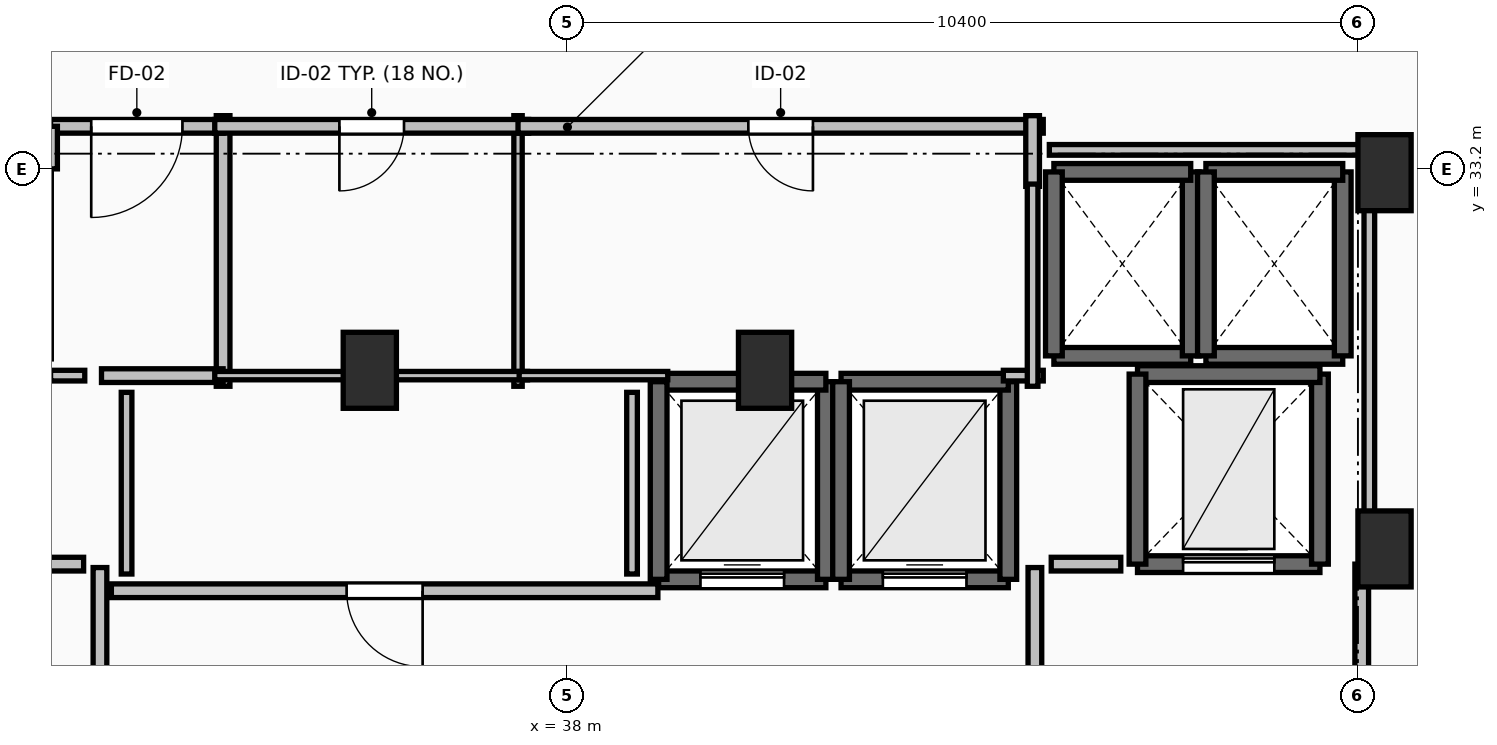
"""IFC4 building model, lengths in metres.
Left out: names, types, materials, properties, quantities, classifications, styles, units other than length and angle.
Written with IfcOpenShell. Run it as: python <this file> out.ifc"""

import sys

from ifc_helpers import new_model, si_unit, direction, frame, frame_2d, origin, origin_2d, place, context, subcontext, project, spatial, rectangle, extrude, element, fill, save


model = new_model("IFC4")
c1 = context("Model", 3, precision=1e-05, world=origin(), true_north=direction((0.0, 1.0)))
c2 = subcontext(c1, "Body", "Model", "MODEL_VIEW")
j1 = project(units=[si_unit("LENGTHUNIT", "METRE"), si_unit("PLANEANGLEUNIT", "RADIAN")], contexts=[c1])
p1 = place(None, origin())
s1 = spatial("IfcSite", under=j1, at=p1, CompositionType="ELEMENT")
p2 = place(p1, origin())
s2 = spatial("IfcBuilding", under=s1, at=p2, CompositionType="ELEMENT")
p3 = place(p2, frame((0.0, 0.0, 269.75)))
s3 = spatial("IfcBuildingStorey", under=s2, at=p3, CompositionType="ELEMENT", Elevation=269.75)
for number, where, z_axis, x_axis in (
    (1, (48.75, 33.15, 0.0), (0.0, 0.0, 1.0), (1.0, 0.0, 0.0)),
    (2, (48.75, 28.2, 0.0), (0.0, 0.0, 1.0), (1.0, 0.0, 0.0)),
    (3, (35.4, 30.55, 0.0), (0.0, 0.0, 1.0), (1.0, 0.0, 0.0)),
    (4, (40.6, 30.55, 0.0), (0.0, 0.0, 1.0), (1.0, 0.0, 0.0)),
):
    element("IfcColumn", number, at=place(p3, frame(where, z_axis=z_axis, x_axis=x_axis)), inside=s3, PredefinedType="PILASTER", context=c2, shape_type="SweptSolid", body=[
        extrude(rectangle(XDim=0.7, YDim=1.0, at=origin_2d()), origin(), (0.0, 0.0, 1.0), 3.55),
    ])
p4 = place(p3, frame((39.2, 27.8, 0.0), z_axis=(0.0, 0.0, 1.0), x_axis=(1.0, 0.0, 0.0)))
e5 = element("IfcWall", 5, at=p4, inside=s3, PredefinedType="SOLIDWALL", context=c2, shape_type="SweptSolid", body=[
    extrude(rectangle(XDim=2.2, YDim=0.22, at=frame_2d((1.1, 0.0))), origin(), (0.0, 0.0, 1.0), 3.29),
])
p5 = place(p4, frame((0.55, 0.0, 0.0)))
e6 = element("IfcOpeningElement", 6, at=p5, cuts=e5, PredefinedType="OPENING", context=c2, shape_type="SweptSolid", body=[
    extrude(rectangle(XDim=1.1, YDim=2.2, at=frame_2d((0.55, 1.1))), frame((0.0, 0.125, 0.0), z_axis=(0.0, -1.0, 0.0), x_axis=(1.0, 0.0, 0.0)), (0.0, 0.0, 1.0), 0.25),
])
p6 = place(p3, frame((41.4, 27.8, 0.0), z_axis=(0.0, 0.0, 1.0), x_axis=(0.0, 1.0, 0.0)))
e7 = element("IfcWall", 7, at=p6, inside=s3, PredefinedType="SOLIDWALL", context=c2, shape_type="SweptSolid", body=[
    extrude(rectangle(XDim=2.6, YDim=0.22, at=frame_2d((1.3, 0.0))), origin(), (0.0, 0.0, 1.0), 3.29),
])
p7 = place(p3, frame((41.4, 30.4, 0.0), z_axis=(0.0, 0.0, 1.0), x_axis=(-1.0, 0.0, 0.0)))
e8 = element("IfcWall", 8, at=p7, inside=s3, PredefinedType="SOLIDWALL", context=c2, shape_type="SweptSolid", body=[
    extrude(rectangle(XDim=2.2, YDim=0.22, at=frame_2d((1.1, 0.0))), origin(), (0.0, 0.0, 1.0), 3.29),
])
p8 = place(p3, frame((39.2, 30.4, 0.0), z_axis=(0.0, 0.0, 1.0), x_axis=(0.0, -1.0, 0.0)))
e9 = element("IfcWall", 9, at=p8, inside=s3, PredefinedType="SOLIDWALL", context=c2, shape_type="SweptSolid", body=[
    extrude(rectangle(XDim=2.6, YDim=0.22, at=frame_2d((1.3, 0.0))), origin(), (0.0, 0.0, 1.0), 3.29),
])
p9 = place(p3, frame((41.6, 27.8, 0.0), z_axis=(0.0, 0.0, 1.0), x_axis=(1.0, 0.0, 0.0)))
e10 = element("IfcWall", 10, at=p9, inside=s3, PredefinedType="SOLIDWALL", context=c2, shape_type="SweptSolid", body=[
    extrude(rectangle(XDim=2.2, YDim=0.22, at=frame_2d((1.1, 0.0))), origin(), (0.0, 0.0, 1.0), 3.29),
])
p10 = place(p9, frame((0.55, 0.0, 0.0)))
e11 = element("IfcOpeningElement", 11, at=p10, cuts=e10, PredefinedType="OPENING", context=c2, shape_type="SweptSolid", body=[
    extrude(rectangle(XDim=1.1, YDim=2.2, at=frame_2d((0.55, 1.1))), frame((0.0, 0.125, 0.0), z_axis=(0.0, -1.0, 0.0), x_axis=(1.0, 0.0, 0.0)), (0.0, 0.0, 1.0), 0.25),
])
p11 = place(p3, frame((43.8, 27.8, 0.0), z_axis=(0.0, 0.0, 1.0), x_axis=(0.0, 1.0, 0.0)))
e12 = element("IfcWall", 12, at=p11, inside=s3, PredefinedType="SOLIDWALL", context=c2, shape_type="SweptSolid", body=[
    extrude(rectangle(XDim=2.6, YDim=0.22, at=frame_2d((1.3, 0.0))), origin(), (0.0, 0.0, 1.0), 3.29),
])
p12 = place(p3, frame((43.8, 30.4, 0.0), z_axis=(0.0, 0.0, 1.0), x_axis=(-1.0, 0.0, 0.0)))
e13 = element("IfcWall", 13, at=p12, inside=s3, PredefinedType="SOLIDWALL", context=c2, shape_type="SweptSolid", body=[
    extrude(rectangle(XDim=2.2, YDim=0.22, at=frame_2d((1.1, 0.0))), origin(), (0.0, 0.0, 1.0), 3.29),
])
p13 = place(p3, frame((41.6, 30.4, 0.0), z_axis=(0.0, 0.0, 1.0), x_axis=(0.0, -1.0, 0.0)))
e14 = element("IfcWall", 14, at=p13, inside=s3, PredefinedType="SOLIDWALL", context=c2, shape_type="SweptSolid", body=[
    extrude(rectangle(XDim=2.6, YDim=0.22, at=frame_2d((1.3, 0.0))), origin(), (0.0, 0.0, 1.0), 3.29),
])
p14 = place(p3, frame((44.4, 30.74, 0.0), z_axis=(0.0, 0.0, 1.0), x_axis=(1.0, 0.0, 0.0)))
e15 = element("IfcWall", 15, at=p14, inside=s3, PredefinedType="SOLIDWALL", context=c2, shape_type="SweptSolid", body=[
    extrude(rectangle(XDim=1.8, YDim=0.22, at=frame_2d((0.9, 0.0))), origin(), (0.0, 0.0, 1.0), 3.29),
])
p15 = place(p3, frame((46.2, 30.74, 0.0), z_axis=(0.0, 0.0, 1.0), x_axis=(0.0, 1.0, 0.0)))
e16 = element("IfcWall", 16, at=p15, inside=s3, PredefinedType="SOLIDWALL", context=c2, shape_type="SweptSolid", body=[
    extrude(rectangle(XDim=2.42, YDim=0.22, at=frame_2d((1.21, 0.0))), origin(), (0.0, 0.0, 1.0), 3.29),
])
p16 = place(p3, frame((46.2, 33.16, 0.0), z_axis=(0.0, 0.0, 1.0), x_axis=(-1.0, 0.0, 0.0)))
e17 = element("IfcWall", 17, at=p16, inside=s3, PredefinedType="SOLIDWALL", context=c2, shape_type="SweptSolid", body=[
    extrude(rectangle(XDim=1.8, YDim=0.22, at=frame_2d((0.9, 0.0))), origin(), (0.0, 0.0, 1.0), 3.29),
])
p17 = place(p3, frame((44.4, 33.16, 0.0), z_axis=(0.0, 0.0, 1.0), x_axis=(0.0, -1.0, 0.0)))
e18 = element("IfcWall", 18, at=p17, inside=s3, PredefinedType="SOLIDWALL", context=c2, shape_type="SweptSolid", body=[
    extrude(rectangle(XDim=2.42, YDim=0.22, at=frame_2d((1.21, 0.0))), origin(), (0.0, 0.0, 1.0), 3.29),
])
p18 = place(p3, frame((46.4, 30.74, 0.0), z_axis=(0.0, 0.0, 1.0), x_axis=(1.0, 0.0, 0.0)))
e19 = element("IfcWall", 19, at=p18, inside=s3, PredefinedType="SOLIDWALL", context=c2, shape_type="SweptSolid", body=[
    extrude(rectangle(XDim=1.8, YDim=0.22, at=frame_2d((0.9, 0.0))), origin(), (0.0, 0.0, 1.0), 3.29),
])
p19 = place(p3, frame((48.2, 30.74, 0.0), z_axis=(0.0, 0.0, 1.0), x_axis=(0.0, 1.0, 0.0)))
e20 = element("IfcWall", 20, at=p19, inside=s3, PredefinedType="SOLIDWALL", context=c2, shape_type="SweptSolid", body=[
    extrude(rectangle(XDim=2.42, YDim=0.22, at=frame_2d((1.21, 0.0))), origin(), (0.0, 0.0, 1.0), 3.29),
])
p20 = place(p3, frame((48.2, 33.16, 0.0), z_axis=(0.0, 0.0, 1.0), x_axis=(-1.0, 0.0, 0.0)))
e21 = element("IfcWall", 21, at=p20, inside=s3, PredefinedType="SOLIDWALL", context=c2, shape_type="SweptSolid", body=[
    extrude(rectangle(XDim=1.8, YDim=0.22, at=frame_2d((0.9, 0.0))), origin(), (0.0, 0.0, 1.0), 3.29),
])
p21 = place(p3, frame((46.4, 33.16, 0.0), z_axis=(0.0, 0.0, 1.0), x_axis=(0.0, -1.0, 0.0)))
e22 = element("IfcWall", 22, at=p21, inside=s3, PredefinedType="SOLIDWALL", context=c2, shape_type="SweptSolid", body=[
    extrude(rectangle(XDim=2.42, YDim=0.22, at=frame_2d((1.21, 0.0))), origin(), (0.0, 0.0, 1.0), 3.29),
])
p22 = place(p3, frame((45.5, 28.0, 0.0), z_axis=(0.0, 0.0, 1.0), x_axis=(1.0, 0.0, 0.0)))
e23 = element("IfcWall", 23, at=p22, inside=s3, PredefinedType="SHEAR", context=c2, shape_type="SweptSolid", body=[
    extrude(rectangle(XDim=2.4, YDim=0.22, at=frame_2d((1.2, 0.0))), origin(), (0.0, 0.0, 1.0), 3.29),
])
p23 = place(p22, frame((0.6, 0.0, 0.0)))
e24 = element("IfcOpeningElement", 24, at=p23, cuts=e23, PredefinedType="OPENING", context=c2, shape_type="SweptSolid", body=[
    extrude(rectangle(XDim=1.2, YDim=2.2, at=frame_2d((0.6, 1.1))), frame((0.0, 0.125, 0.0), z_axis=(0.0, -1.0, 0.0), x_axis=(1.0, 0.0, 0.0)), (0.0, 0.0, 1.0), 0.25),
])
p24 = place(p3, frame((47.9, 28.0, 0.0), z_axis=(0.0, 0.0, 1.0), x_axis=(0.0, 1.0, 0.0)))
e25 = element("IfcWall", 25, at=p24, inside=s3, PredefinedType="SHEAR", context=c2, shape_type="SweptSolid", body=[
    extrude(rectangle(XDim=2.5, YDim=0.22, at=frame_2d((1.25, 0.0))), origin(), (0.0, 0.0, 1.0), 3.29),
])
p25 = place(p3, frame((47.9, 30.5, 0.0), z_axis=(0.0, 0.0, 1.0), x_axis=(-1.0, 0.0, 0.0)))
e26 = element("IfcWall", 26, at=p25, inside=s3, PredefinedType="SHEAR", context=c2, shape_type="SweptSolid", body=[
    extrude(rectangle(XDim=2.4, YDim=0.22, at=frame_2d((1.2, 0.0))), origin(), (0.0, 0.0, 1.0), 3.29),
])
p26 = place(p3, frame((45.5, 30.5, 0.0), z_axis=(0.0, 0.0, 1.0), x_axis=(0.0, -1.0, 0.0)))
e27 = element("IfcWall", 27, at=p26, inside=s3, PredefinedType="SHEAR", context=c2, shape_type="SweptSolid", body=[
    extrude(rectangle(XDim=2.5, YDim=0.22, at=frame_2d((1.25, 0.0))), origin(), (0.0, 0.0, 1.0), 3.29),
])
p27 = place(p3, frame((31.85, 24.045, 0.0), z_axis=(0.0, 0.0, 1.0), x_axis=(0.0, 1.0, 0.0)))
e28 = element("IfcWall", 28, at=p27, inside=s3, PredefinedType="PARTITIONING", context=c2, shape_type="SweptSolid", body=[
    extrude(rectangle(XDim=3.91, YDim=0.18, at=frame_2d((1.955, 0.0))), origin(), (0.0, 0.0, 1.0), 3.29),
])
p28 = place(p27, frame((1.355, 0.0, 0.0)))
e29 = element("IfcOpeningElement", 29, at=p28, cuts=e28, PredefinedType="OPENING", context=c2, shape_type="SweptSolid", body=[
    extrude(rectangle(XDim=1.2, YDim=2.15, at=frame_2d((0.6, 1.075))), frame((0.0, 0.105, 0.0), z_axis=(0.0, -1.0, 0.0), x_axis=(1.0, 0.0, 0.0)), (0.0, 0.0, 1.0), 0.21),
])
p29 = place(p3, frame((44.15, 27.955, 0.0), z_axis=(0.0, 0.0, 1.0), x_axis=(0.0, -1.0, 0.0)))
e30 = element("IfcWall", 30, at=p29, inside=s3, PredefinedType="PARTITIONING", context=c2, shape_type="SweptSolid", body=[
    extrude(rectangle(XDim=3.91, YDim=0.18, at=frame_2d((1.955, 0.0))), origin(), (0.0, 0.0, 1.0), 3.29),
])
p30 = place(p29, frame((1.355, 0.0, 0.0)))
e31 = element("IfcOpeningElement", 31, at=p30, cuts=e30, PredefinedType="OPENING", context=c2, shape_type="SweptSolid", body=[
    extrude(rectangle(XDim=1.2, YDim=2.15, at=frame_2d((0.6, 1.075))), frame((0.0, 0.105, 0.0), z_axis=(0.0, -1.0, 0.0), x_axis=(1.0, 0.0, 0.0)), (0.0, 0.0, 1.0), 0.21),
])
p31 = place(p3, frame((48.45, 23.95, 0.0), z_axis=(0.0, 0.0, 1.0), x_axis=(0.0, 1.0, 0.0)))
e32 = element("IfcWall", 32, at=p31, inside=s3, PredefinedType="PARTITIONING", context=c2, shape_type="SweptSolid", body=[
    extrude(rectangle(XDim=4.05, YDim=0.18, at=frame_2d((2.025, 0.0))), origin(), (0.0, 0.0, 1.0), 3.29),
])
p32 = place(p31, frame((1.425, 0.0, 0.0)))
e33 = element("IfcOpeningElement", 33, at=p32, cuts=e32, PredefinedType="OPENING", context=c2, shape_type="SweptSolid", body=[
    extrude(rectangle(XDim=1.2, YDim=2.15, at=frame_2d((0.6, 1.075))), frame((0.0, 0.105, 0.0), z_axis=(0.0, -1.0, 0.0), x_axis=(1.0, 0.0, 0.0)), (0.0, 0.0, 1.0), 0.21),
])
p33 = place(p3, frame((33.47, 30.34, 0.0), z_axis=(0.0, 0.0, 1.0), x_axis=(0.0, 1.0, 0.0)))
e34 = element("IfcWall", 34, at=p33, inside=s3, PredefinedType="PARTITIONING", context=c2, shape_type="SweptSolid", body=[
    extrude(rectangle(XDim=3.56, YDim=0.18, at=frame_2d((1.78, 0.0))), origin(), (0.0, 0.0, 1.0), 3.29),
])
p34 = place(p3, frame((31.87, 30.48, 0.0), z_axis=(0.0, 0.0, 1.0), x_axis=(1.0, 0.0, 0.0)))
e35 = element("IfcWall", 35, at=p34, inside=s3, PredefinedType="PARTITIONING", context=c2, shape_type="SweptSolid", body=[
    extrude(rectangle(XDim=1.6, YDim=0.18, at=frame_2d((0.8, 0.0))), origin(), (0.0, 0.0, 1.0), 3.29),
])
p35 = place(p3, frame((33.47, 33.76, 0.0), z_axis=(0.0, 0.0, 1.0), x_axis=(-1.0, 0.0, 0.0)))
e36 = element("IfcWall", 36, at=p35, inside=s3, PredefinedType="PARTITIONING", context=c2, shape_type="SweptSolid", body=[
    extrude(rectangle(XDim=2.27, YDim=0.18, at=frame_2d((1.135, 0.0))), origin(), (0.0, 0.0, 1.0), 3.29),
])
p36 = place(p35, frame((0.535, 0.0, 0.0)))
e37 = element("IfcOpeningElement", 37, at=p36, cuts=e36, PredefinedType="OPENING", context=c2, shape_type="SweptSolid", body=[
    extrude(rectangle(XDim=1.2, YDim=2.15, at=frame_2d((0.6, 1.075))), frame((0.0, 0.105, 0.0), z_axis=(0.0, -1.0, 0.0), x_axis=(1.0, 0.0, 0.0)), (0.0, 0.0, 1.0), 0.21),
])
p37 = place(p3, frame((31.2, 33.76, 0.0), z_axis=(0.0, 0.0, 1.0), x_axis=(0.0, -1.0, 0.0)))
e38 = element("IfcWall", 38, at=p37, inside=s3, PredefinedType="PARTITIONING", context=c2, shape_type="SweptSolid", body=[
    extrude(rectangle(XDim=0.56, YDim=0.18, at=frame_2d((0.28, 0.0))), origin(), (0.0, 0.0, 1.0), 3.29),
])
p38 = place(p3, frame((39.19, 27.65, 0.0), z_axis=(0.0, 0.0, 1.0), x_axis=(-1.0, 0.0, 0.0)))
e39 = element("IfcWall", 39, at=p38, inside=s3, PredefinedType="PARTITIONING", context=c2, shape_type="SweptSolid", body=[
    extrude(rectangle(XDim=7.19, YDim=0.18, at=frame_2d((3.595, 0.0))), origin(), (0.0, 0.0, 1.0), 3.29),
])
p39 = place(p38, frame((3.095, 0.0, 0.0)))
e40 = element("IfcOpeningElement", 40, at=p39, cuts=e39, PredefinedType="OPENING", context=c2, shape_type="SweptSolid", body=[
    extrude(rectangle(XDim=1.0, YDim=2.15, at=frame_2d((0.5, 1.075))), frame((0.0, 0.105, 0.0), z_axis=(0.0, -1.0, 0.0), x_axis=(1.0, 0.0, 0.0)), (0.0, 0.0, 1.0), 0.21),
])
p40 = place(p3, frame((37.35, 30.34, 0.0), z_axis=(0.0, 0.0, 1.0), x_axis=(0.0, 1.0, 0.0)))
e41 = element("IfcWall", 41, at=p40, inside=s3, PredefinedType="PARTITIONING", context=c2, shape_type="SweptSolid", body=[
    extrude(rectangle(XDim=3.56, YDim=0.11, at=frame_2d((1.78, 0.0))), origin(), (0.0, 0.0, 1.0), 2.482),
])
p41 = place(p3, frame((33.36, 30.48, 0.0), z_axis=(0.0, 0.0, 1.0), x_axis=(1.0, 0.0, 0.0)))
e42 = element("IfcWall", 42, at=p41, inside=s3, PredefinedType="PARTITIONING", context=c2, shape_type="SweptSolid", body=[
    extrude(rectangle(XDim=4.115, YDim=0.11, at=frame_2d((2.058, 0.0))), origin(), (0.0, 0.0, 1.0), 2.482),
])
p42 = place(p3, frame((37.49, 33.76, 0.0), z_axis=(0.0, 0.0, 1.0), x_axis=(-1.0, 0.0, 0.0)))
e43 = element("IfcWall", 43, at=p42, inside=s3, PredefinedType="PARTITIONING", context=c2, shape_type="SweptSolid", body=[
    extrude(rectangle(XDim=4.13, YDim=0.18, at=frame_2d((2.065, 0.0))), origin(), (0.0, 0.0, 1.0), 3.29),
])
p43 = place(p42, frame((1.64, 0.0, 0.0)))
e44 = element("IfcOpeningElement", 44, at=p43, cuts=e43, PredefinedType="OPENING", context=c2, shape_type="SweptSolid", body=[
    extrude(rectangle(XDim=0.85, YDim=2.1, at=frame_2d((0.425, 1.05))), frame((0.0, 0.105, 0.0), z_axis=(0.0, -1.0, 0.0), x_axis=(1.0, 0.0, 0.0)), (0.0, 0.0, 1.0), 0.21),
])
p44 = place(p3, frame((37.365, 30.48, 0.0), z_axis=(0.0, 0.0, 1.0), x_axis=(1.0, 0.0, 0.0)))
e45 = element("IfcWall", 45, at=p44, inside=s3, PredefinedType="PARTITIONING", context=c2, shape_type="SweptSolid", body=[
    extrude(rectangle(XDim=1.955, YDim=0.11, at=frame_2d((0.978, 0.0))), origin(), (0.0, 0.0, 1.0), 2.482),
])
p45 = place(p3, frame((44.26, 33.76, 0.0), z_axis=(0.0, 0.0, 1.0), x_axis=(-1.0, 0.0, 0.0)))
e46 = element("IfcWall", 46, at=p45, inside=s3, PredefinedType="PARTITIONING", context=c2, shape_type="SweptSolid", body=[
    extrude(rectangle(XDim=6.91, YDim=0.18, at=frame_2d((3.455, 0.0))), origin(), (0.0, 0.0, 1.0), 3.29),
])
p46 = place(p45, frame((3.03, 0.0, 0.0)))
e47 = element("IfcOpeningElement", 47, at=p46, cuts=e46, PredefinedType="OPENING", context=c2, shape_type="SweptSolid", body=[
    extrude(rectangle(XDim=0.85, YDim=2.1, at=frame_2d((0.425, 1.05))), frame((0.0, 0.105, 0.0), z_axis=(0.0, -1.0, 0.0), x_axis=(1.0, 0.0, 0.0)), (0.0, 0.0, 1.0), 0.21),
])
p47 = place(p3, frame((44.12, 32.97, 0.0), z_axis=(0.0, 0.0, 1.0), x_axis=(0.0, 1.0, 0.0)))
e48 = element("IfcWall", 48, at=p47, inside=s3, PredefinedType="PARTITIONING", context=c2, shape_type="SweptSolid", body=[
    extrude(rectangle(XDim=0.93, YDim=0.18, at=frame_2d((0.465, 0.0))), origin(), (0.0, 0.0, 1.0), 3.29),
])
for number, where, z_axis, x_axis in (
    (49, (31.635, 28.0, 0.0), (0.0, 0.0, 1.0), (-1.0, 0.0, 0.0)),
    (50, (45.28, 28.0, 0.0), (0.0, 0.0, 1.0), (-1.0, 0.0, 0.0)),
):
    element("IfcWall", number, at=place(p3, frame(where, z_axis=z_axis, x_axis=x_axis)), inside=s3, PredefinedType="PARTITIONING", context=c2, shape_type="SweptSolid", body=[
        extrude(rectangle(XDim=0.915, YDim=0.18, at=frame_2d((0.458, 0.0))), origin(), (0.0, 0.0, 1.0), 3.29),
    ])
p48 = place(p3, frame((31.2, 30.48, 0.0), z_axis=(0.0, 0.0, 1.0), x_axis=(1.0, 0.0, 0.0)))
e51 = element("IfcWall", 51, at=p48, inside=s3, PredefinedType="PARTITIONING", context=c2, shape_type="SweptSolid", body=[
    extrude(rectangle(XDim=0.45, YDim=0.14, at=frame_2d((0.225, 0.0))), origin(), (0.0, 0.0, 1.0), 3.29),
])
p49 = place(p3, frame((43.735, 30.48, 0.0), z_axis=(0.0, 0.0, 1.0), x_axis=(1.0, 0.0, 0.0)))
e52 = element("IfcWall", 52, at=p49, inside=s3, PredefinedType="PARTITIONING", context=c2, shape_type="SweptSolid", body=[
    extrude(rectangle(XDim=0.525, YDim=0.14, at=frame_2d((0.262, 0.0))), origin(), (0.0, 0.0, 1.0), 3.29),
])
p50 = place(p3, frame((44.12, 30.34, 0.0), z_axis=(0.0, 0.0, 1.0), x_axis=(0.0, 1.0, 0.0)))
e53 = element("IfcWall", 53, at=p50, inside=s3, PredefinedType="PARTITIONING", context=c2, shape_type="SweptSolid", body=[
    extrude(rectangle(XDim=2.66, YDim=0.14, at=frame_2d((1.33, 0.0))), origin(), (0.0, 0.0, 1.0), 3.29),
])
for number, where, z_axis, x_axis in (
    (54, (32.2, 30.26, 0.0), (0.0, 0.0, 1.0), (0.0, -1.0, 0.0)),
    (55, (38.85, 27.87, 0.0), (0.0, 0.0, 1.0), (0.0, 1.0, 0.0)),
):
    element("IfcWall", number, at=place(p3, frame(where, z_axis=z_axis, x_axis=x_axis)), inside=s3, PredefinedType="PARTITIONING", context=c2, shape_type="SweptSolid", body=[
        extrude(rectangle(XDim=2.39, YDim=0.14, at=frame_2d((1.195, 0.0))), origin(), (0.0, 0.0, 1.0), 3.29),
    ])
p51 = place(p3, frame((48.55, 28.196, 0.0), z_axis=(0.0, 0.0, 1.0), x_axis=(0.0, 1.0, 0.0)))
e56 = element("IfcWall", 56, at=p51, inside=s3, PredefinedType="PARTITIONING", context=c2, shape_type="SweptSolid", body=[
    extrude(rectangle(XDim=5.254, YDim=0.14, at=frame_2d((2.627, 0.0))), origin(), (0.0, 0.0, 1.0), 2.482),
])
p52 = place(p3, frame((48.55, 33.45, 0.0), z_axis=(0.0, 0.0, 1.0), x_axis=(-1.0, 0.0, 0.0)))
e57 = element("IfcWall", 57, at=p52, inside=s3, PredefinedType="PARTITIONING", context=c2, shape_type="SweptSolid", body=[
    extrude(rectangle(XDim=4.21, YDim=0.14, at=frame_2d((2.105, 0.0))), origin(), (0.0, 0.0, 1.0), 2.482),
])
p53 = place(p5, origin())
e58 = element("IfcDoor", 58, at=p53, inside=s3, OperationType="SLIDING_TO_LEFT", PredefinedType="DOOR", context=c2, shape_type="SweptSolid", body=[
    extrude(rectangle(XDim=1.1, YDim=2.2, at=frame_2d((0.55, 1.1))), frame((0.0, 0.025, 0.0), z_axis=(0.0, -1.0, 0.0), x_axis=(1.0, 0.0, 0.0)), (0.0, 0.0, 1.0), 0.05),
])
fill(e6, e58)
p54 = place(p10, origin())
e59 = element("IfcDoor", 59, at=p54, inside=s3, OperationType="SLIDING_TO_LEFT", PredefinedType="DOOR", context=c2, shape_type="SweptSolid", body=[
    extrude(rectangle(XDim=1.1, YDim=2.2, at=frame_2d((0.55, 1.1))), frame((0.0, 0.025, 0.0), z_axis=(0.0, -1.0, 0.0), x_axis=(1.0, 0.0, 0.0)), (0.0, 0.0, 1.0), 0.05),
])
fill(e11, e59)
p55 = place(p23, origin())
e60 = element("IfcDoor", 60, at=p55, inside=s3, OperationType="SLIDING_TO_LEFT", PredefinedType="DOOR", context=c2, shape_type="SweptSolid", body=[
    extrude(rectangle(XDim=1.2, YDim=2.2, at=frame_2d((0.6, 1.1))), frame((0.0, 0.025, 0.0), z_axis=(0.0, -1.0, 0.0), x_axis=(1.0, 0.0, 0.0)), (0.0, 0.0, 1.0), 0.05),
])
fill(e24, e60)
p56 = place(p36, origin())
e61 = element("IfcDoor", 61, at=p56, inside=s3, OperationType="SINGLE_SWING_RIGHT", PredefinedType="DOOR", context=c2, shape_type="SweptSolid", body=[
    extrude(rectangle(XDim=1.2, YDim=2.15, at=frame_2d((0.6, 1.075))), frame((0.0, 0.025, 0.0), z_axis=(0.0, -1.0, 0.0), x_axis=(1.0, 0.0, 0.0)), (0.0, 0.0, 1.0), 0.05),
])
fill(e37, e61)
p57 = place(p39, origin())
e62 = element("IfcDoor", 62, at=p57, inside=s3, OperationType="SINGLE_SWING_LEFT", PredefinedType="DOOR", context=c2, shape_type="SweptSolid", body=[
    extrude(rectangle(XDim=1.0, YDim=2.15, at=frame_2d((0.5, 1.075))), frame((0.0, 0.025, 0.0), z_axis=(0.0, -1.0, 0.0), x_axis=(1.0, 0.0, 0.0)), (0.0, 0.0, 1.0), 0.05),
])
fill(e40, e62)
p58 = place(p43, origin())
e63 = element("IfcDoor", 63, at=p58, inside=s3, OperationType="SINGLE_SWING_RIGHT", PredefinedType="DOOR", context=c2, shape_type="SweptSolid", body=[
    extrude(rectangle(XDim=0.85, YDim=2.1, at=frame_2d((0.425, 1.05))), frame((0.0, 0.025, 0.0), z_axis=(0.0, -1.0, 0.0), x_axis=(1.0, 0.0, 0.0)), (0.0, 0.0, 1.0), 0.05),
])
fill(e44, e63)
p59 = place(p46, origin())
e64 = element("IfcDoor", 64, at=p59, inside=s3, OperationType="SINGLE_SWING_LEFT", PredefinedType="DOOR", context=c2, shape_type="SweptSolid", body=[
    extrude(rectangle(XDim=0.85, YDim=2.1, at=frame_2d((0.425, 1.05))), frame((0.0, 0.025, 0.0), z_axis=(0.0, -1.0, 0.0), x_axis=(1.0, 0.0, 0.0)), (0.0, 0.0, 1.0), 0.05),
])
fill(e47, e64)
save(model, sys.argv[1])
